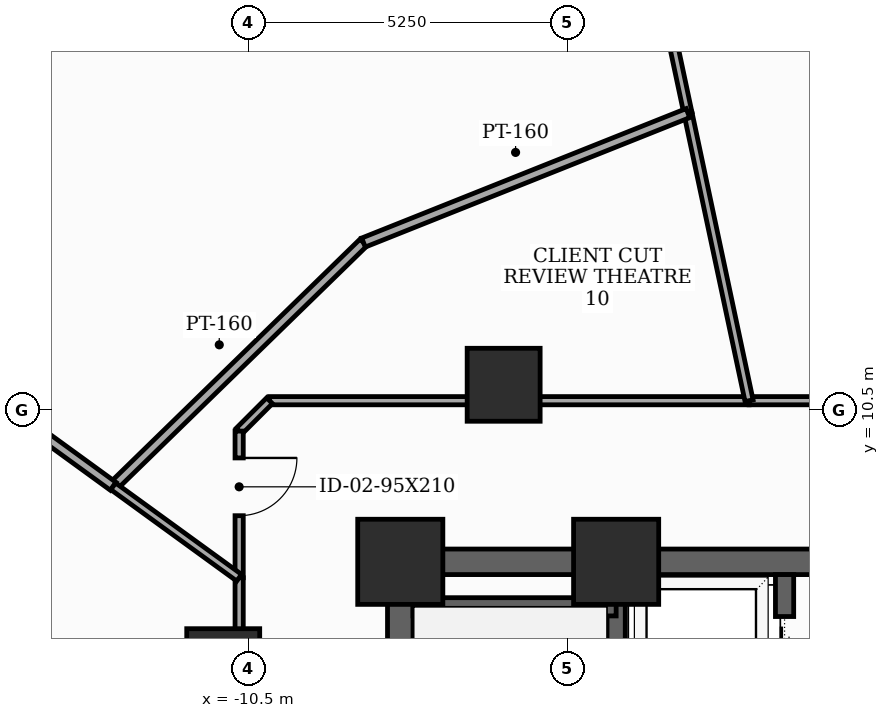
"""IFC4 building model, lengths in metres.
Left out: names, types, materials, properties, quantities, classifications, styles, units other than length and angle.
Written with IfcOpenShell. Run it as: python <this file> out.ifc"""

import sys

from ifc_helpers import new_model, si_unit, direction, frame, frame_2d, origin, origin_2d, place, context, subcontext, project, spatial, rectangle, extrude, element, fill, save


model = new_model("IFC4")
c1 = context("Model", 3, precision=1e-05, world=origin(), true_north=direction((0.0, 1.0)))
c2 = subcontext(c1, "Body", "Model", "MODEL_VIEW")
j1 = project(units=[si_unit("LENGTHUNIT", "METRE"), si_unit("PLANEANGLEUNIT", "RADIAN")], contexts=[c1])
p1 = place(None, origin())
s1 = spatial("IfcSite", under=j1, at=p1, CompositionType="ELEMENT")
p2 = place(p1, origin())
s2 = spatial("IfcBuilding", under=s1, at=p2, CompositionType="ELEMENT")
p3 = place(p2, frame((0.0, 0.0, 94.0)))
s3 = spatial("IfcBuildingStorey", under=s2, at=p3, CompositionType="ELEMENT", Elevation=94.0)
for number, where, z_axis, x_axis in (
    (1, (-4.45, 8.0, 0.0), (0.0, 0.0, 1.0), (1.0, 0.0, 0.0)),
    (2, (-8.0, 8.0, 0.0), (0.0, 0.0, 1.0), (1.0, 0.0, 0.0)),
):
    element("IfcColumn", number, at=place(p3, frame(where, z_axis=z_axis, x_axis=x_axis)), inside=s3, PredefinedType="COLUMN", context=c2, shape_type="SweptSolid", body=[
        extrude(rectangle(XDim=1.4, YDim=1.4, at=origin_2d()), origin(), (0.0, 0.0, 1.0), 3.7),
    ])
for number, where, z_axis, x_axis in (
    (3, (-6.3, 10.912, 0.0), (0.0, 0.0, 1.0), (1.0, 0.0, 0.0)),
    (4, (-10.912, 6.3, 0.0), (0.0, 0.0, 1.0), (1.0, 0.0, 0.0)),
):
    element("IfcColumn", number, at=place(p3, frame(where, z_axis=z_axis, x_axis=x_axis)), inside=s3, PredefinedType="COLUMN", context=c2, shape_type="SweptSolid", body=[
        extrude(rectangle(XDim=1.2, YDim=1.2, at=origin_2d()), origin(), (0.0, 0.0, 1.0), 3.7),
    ])
p4 = place(p3, frame((-8.0, -8.0, 0.0), z_axis=(0.0, 0.0, 1.0), x_axis=(0.0, 1.0, 0.0)))
e5 = element("IfcWall", 5, at=p4, inside=s3, PredefinedType="SHEAR", context=c2, shape_type="SweptSolid", body=[
    extrude(rectangle(XDim=16.0, YDim=0.42, at=frame_2d((8.0, 0.0))), origin(), (0.0, 0.0, 1.0), 3.5),
])
p5 = place(p4, frame((0.922, 0.0, 0.0)))
e6 = element("IfcOpeningElement", 6, at=p5, cuts=e5, PredefinedType="OPENING", context=c2, shape_type="SweptSolid", body=[
    extrude(rectangle(XDim=0.85, YDim=2.02, at=frame_2d((0.425, 1.01))), frame((0.0, 0.22, 0.0), z_axis=(0.0, -1.0, 0.0), x_axis=(1.0, 0.0, 0.0)), (0.0, 0.0, 1.0), 0.44),
])
p6 = place(p4, frame((5.35, 0.0, 0.0)))
e7 = element("IfcOpeningElement", 7, at=p6, cuts=e5, PredefinedType="OPENING", context=c2, shape_type="SweptSolid", body=[
    extrude(rectangle(XDim=1.05, YDim=2.15, at=frame_2d((0.525, 1.075))), frame((0.0, 0.22, 0.0), z_axis=(0.0, -1.0, 0.0), x_axis=(1.0, 0.0, 0.0)), (0.0, 0.0, 1.0), 0.44),
])
p7 = place(p3, frame((-8.0, 8.0, 0.0), z_axis=(0.0, 0.0, 1.0), x_axis=(1.0, 0.0, 0.0)))
e8 = element("IfcWall", 8, at=p7, inside=s3, PredefinedType="SHEAR", context=c2, shape_type="SweptSolid", body=[
    extrude(rectangle(XDim=16.0, YDim=0.42, at=frame_2d((8.0, 0.0))), origin(), (0.0, 0.0, 1.0), 3.5),
])
p8 = place(p7, frame((7.1, 0.0, 0.0)))
e9 = element("IfcOpeningElement", 9, at=p8, cuts=e8, PredefinedType="OPENING", context=c2, shape_type="SweptSolid", body=[
    extrude(rectangle(XDim=1.8, YDim=2.15, at=frame_2d((0.9, 1.075))), frame((0.0, 0.22, 0.0), z_axis=(0.0, -1.0, 0.0), x_axis=(1.0, 0.0, 0.0)), (0.0, 0.0, 1.0), 0.44),
])
p9 = place(p3, frame((-4.45, -7.79, 0.0), z_axis=(0.0, 0.0, 1.0), x_axis=(0.0, 1.0, 0.0)))
e10 = element("IfcWall", 10, at=p9, inside=s3, PredefinedType="SHEAR", context=c2, shape_type="SweptSolid", body=[
    extrude(rectangle(XDim=15.58, YDim=0.3, at=frame_2d((7.79, 0.0))), origin(), (0.0, 0.0, 1.0), 3.5),
])
p10 = place(p3, frame((-7.79, 7.26, 0.0), z_axis=(0.0, 0.0, 1.0), x_axis=(1.0, 0.0, 0.0)))
e11 = element("IfcWall", 11, at=p10, inside=s3, PredefinedType="SHEAR", context=c2, shape_type="SweptSolid", body=[
    extrude(rectangle(XDim=3.34, YDim=0.3, at=frame_2d((1.67, 0.0))), origin(), (0.0, 0.0, 1.0), 3.5),
])
p11 = place(p3, frame((-1.68, -4.85, 0.0), z_axis=(0.0, 0.0, 1.0), x_axis=(0.0, 1.0, 0.0)))
e12 = element("IfcWall", 12, at=p11, inside=s3, PredefinedType="SHEAR", context=c2, shape_type="SweptSolid", body=[
    extrude(rectangle(XDim=12.64, YDim=0.3, at=frame_2d((6.32, 0.0))), origin(), (0.0, 0.0, 1.0), 3.5),
])
p12 = place(p11, frame((3.95, 0.0, 0.0)))
e13 = element("IfcOpeningElement", 13, at=p12, cuts=e12, PredefinedType="OPENING", context=c2, shape_type="SweptSolid", body=[
    extrude(rectangle(XDim=1.1, YDim=2.1, at=frame_2d((0.55, 1.05))), frame((0.0, 0.16, 0.0), z_axis=(0.0, -1.0, 0.0), x_axis=(1.0, 0.0, 0.0)), (0.0, 0.0, 1.0), 0.32),
])
p13 = place(p11, frame((6.25, 0.0, 0.0)))
e14 = element("IfcOpeningElement", 14, at=p13, cuts=e12, PredefinedType="OPENING", context=c2, shape_type="SweptSolid", body=[
    extrude(rectangle(XDim=1.1, YDim=2.1, at=frame_2d((0.55, 1.05))), frame((0.0, 0.16, 0.0), z_axis=(0.0, -1.0, 0.0), x_axis=(1.0, 0.0, 0.0)), (0.0, 0.0, 1.0), 0.32),
])
p14 = place(p11, frame((8.55, 0.0, 0.0)))
e15 = element("IfcOpeningElement", 15, at=p14, cuts=e12, PredefinedType="OPENING", context=c2, shape_type="SweptSolid", body=[
    extrude(rectangle(XDim=1.1, YDim=2.1, at=frame_2d((0.55, 1.05))), frame((0.0, 0.16, 0.0), z_axis=(0.0, -1.0, 0.0), x_axis=(1.0, 0.0, 0.0)), (0.0, 0.0, 1.0), 0.32),
])
p15 = place(p11, frame((10.85, 0.0, 0.0)))
e16 = element("IfcOpeningElement", 16, at=p15, cuts=e12, PredefinedType="OPENING", context=c2, shape_type="SweptSolid", body=[
    extrude(rectangle(XDim=1.1, YDim=2.1, at=frame_2d((0.55, 1.05))), frame((0.0, 0.16, 0.0), z_axis=(0.0, -1.0, 0.0), x_axis=(1.0, 0.0, 0.0)), (0.0, 0.0, 1.0), 0.32),
])
p16 = place(p11, frame((1.15, 0.0, 0.0)))
e17 = element("IfcOpeningElement", 17, at=p16, cuts=e12, PredefinedType="OPENING", context=c2, shape_type="SweptSolid", body=[
    extrude(rectangle(XDim=0.92, YDim=2.1, at=frame_2d((0.46, 1.05))), frame((0.0, 0.16, 0.0), z_axis=(0.0, -1.0, 0.0), x_axis=(1.0, 0.0, 0.0)), (0.0, 0.0, 1.0), 0.32),
])
p17 = place(p3, frame((10.15, 10.65, 0.0), z_axis=(0.0, 0.0, 1.0), x_axis=(-1.0, 0.0, 0.0)))
e18 = element("IfcWall", 18, at=p17, inside=s3, PredefinedType="PARTITIONING", context=c2, shape_type="SweptSolid", body=[
    extrude(rectangle(XDim=12.414, YDim=0.135, at=frame_2d((6.207, 0.0))), origin(), (0.0, 0.0, 1.0), 2.785),
])
p18 = place(p17, frame((7.222, 0.0, 0.0)))
e19 = element("IfcOpeningElement", 19, at=p18, cuts=e18, PredefinedType="OPENING", context=c2, shape_type="SweptSolid", body=[
    extrude(rectangle(XDim=0.95, YDim=2.1, at=frame_2d((0.475, 1.05))), frame((0.0, 0.077, 0.0), z_axis=(0.0, -1.0, 0.0), x_axis=(1.0, 0.0, 0.0)), (0.0, 0.0, 1.0), 0.155),
])
p19 = place(p3, frame((-2.264, 10.65, 0.0), z_axis=(0.0, 0.0, 1.0), x_axis=(-1.0, 0.0, 0.0)))
e20 = element("IfcWall", 20, at=p19, inside=s3, PredefinedType="PARTITIONING", context=c2, shape_type="SweptSolid", body=[
    extrude(rectangle(XDim=7.886, YDim=0.135, at=frame_2d((3.943, 0.0))), origin(), (0.0, 0.0, 1.0), 2.785),
])
p20 = place(p3, frame((-10.15, 10.65, 0.0), z_axis=(0.0, 0.0, 1.0), x_axis=(-0.707106781187, -0.707106781187, 0.0)))
e21 = element("IfcWall", 21, at=p20, inside=s3, PredefinedType="PARTITIONING", context=c2, shape_type="SweptSolid", body=[
    extrude(rectangle(XDim=0.707, YDim=0.135, at=frame_2d((0.354, 0.0))), origin(), (0.0, 0.0, 1.0), 3.5),
])
p21 = place(p3, frame((-10.65, 10.15, 0.0), z_axis=(0.0, 0.0, 1.0), x_axis=(0.0, -1.0, 0.0)))
e22 = element("IfcWall", 22, at=p21, inside=s3, PredefinedType="PARTITIONING", context=c2, shape_type="SweptSolid", body=[
    extrude(rectangle(XDim=2.412, YDim=0.135, at=frame_2d((1.206, 0.0))), origin(), (0.0, 0.0, 1.0), 3.5),
])
p22 = place(p21, frame((0.442, 0.0, 0.0)))
e23 = element("IfcOpeningElement", 23, at=p22, cuts=e22, PredefinedType="OPENING", context=c2, shape_type="SweptSolid", body=[
    extrude(rectangle(XDim=0.95, YDim=2.1, at=frame_2d((0.475, 1.05))), frame((0.0, 0.077, 0.0), z_axis=(0.0, -1.0, 0.0), x_axis=(1.0, 0.0, 0.0)), (0.0, 0.0, 1.0), 0.155),
])
p23 = place(p3, frame((-10.65, 7.738, 0.0), z_axis=(0.0, 0.0, 1.0), x_axis=(0.0, -1.0, 0.0)))
e24 = element("IfcWall", 24, at=p23, inside=s3, PredefinedType="PARTITIONING", context=c2, shape_type="SweptSolid", body=[
    extrude(rectangle(XDim=5.288, YDim=0.135, at=frame_2d((2.644, 0.0))), origin(), (0.0, 0.0, 1.0), 2.785),
])
p24 = place(p23, frame((3.755, 0.0, 0.0)))
e25 = element("IfcOpeningElement", 25, at=p24, cuts=e24, PredefinedType="OPENING", context=c2, shape_type="SweptSolid", body=[
    extrude(rectangle(XDim=0.95, YDim=2.1, at=frame_2d((0.475, 1.05))), frame((0.0, 0.077, 0.0), z_axis=(0.0, -1.0, 0.0), x_axis=(1.0, 0.0, 0.0)), (0.0, 0.0, 1.0), 0.155),
])
p25 = place(p3, frame((-6.381, 30.021, 0.0), z_axis=(0.0, 0.0, 1.0), x_axis=(0.207886847462, -0.978152881022, 0.0)))
e26 = element("IfcWall", 26, at=p25, inside=s3, PredefinedType="PARTITIONING", context=c2, shape_type="SweptSolid", body=[
    extrude(rectangle(XDim=14.968, YDim=0.135, at=frame_2d((7.484, 0.0))), origin(), (0.0, 0.0, 1.0), 2.935),
])
p26 = place(p25, frame((7.024, 0.0, 0.0)))
e27 = element("IfcOpeningElement", 27, at=p26, cuts=e26, PredefinedType="OPENING", context=c2, shape_type="SweptSolid", body=[
    extrude(rectangle(XDim=0.92, YDim=2.1, at=frame_2d((0.46, 1.05))), frame((0.0, 0.077, 0.0), z_axis=(0.0, -1.0, 0.0), x_axis=(1.0, 0.0, 0.0)), (0.0, 0.0, 1.0), 0.155),
])
p27 = place(p3, frame((-3.269, 15.38, 0.0), z_axis=(0.0, 0.0, 1.0), x_axis=(0.207859963491, -0.978158594287, 0.0)))
e28 = element("IfcWall", 28, at=p27, inside=s3, PredefinedType="PARTITIONING", context=c2, shape_type="SweptSolid", body=[
    extrude(rectangle(XDim=4.836, YDim=0.135, at=frame_2d((2.418, 0.0))), origin(), (0.0, 0.0, 1.0), 2.785),
])
p28 = place(p3, frame((-12.721, 9.242, 0.0), z_axis=(0.0, 0.0, 1.0), x_axis=(0.716351016203, 0.697740081682, 0.0)))
e29 = element("IfcWall", 29, at=p28, inside=s3, PredefinedType="PARTITIONING", context=c2, shape_type="SweptSolid", body=[
    extrude(rectangle(XDim=5.746, YDim=0.16, at=frame_2d((2.873, 0.0))), origin(), (0.0, 0.0, 1.0), 2.785),
])
p29 = place(p3, frame((-8.605, 13.251, 0.0), z_axis=(0.0, 0.0, 1.0), x_axis=(0.928804577443, 0.370569908277, 0.0)))
e30 = element("IfcWall", 30, at=p29, inside=s3, PredefinedType="PARTITIONING", context=c2, shape_type="SweptSolid", body=[
    extrude(rectangle(XDim=5.745, YDim=0.16, at=frame_2d((2.873, 0.0))), origin(), (0.0, 0.0, 1.0), 2.785),
])
p30 = place(p3, frame((-16.004, 11.628, 0.0), z_axis=(0.0, 0.0, 1.0), x_axis=(0.80899612579, -0.587813974364, 0.0)))
e31 = element("IfcWall", 31, at=p30, inside=s3, PredefinedType="PARTITIONING", context=c2, shape_type="SweptSolid", body=[
    extrude(rectangle(XDim=4.059, YDim=0.16, at=frame_2d((2.029, 0.0))), origin(), (0.0, 0.0, 1.0), 2.925),
])
p31 = place(p3, frame((-12.721, 9.242, 0.0), z_axis=(0.0, 0.0, 1.0), x_axis=(0.80916485127, -0.58758169089, 0.0)))
e32 = element("IfcWall", 32, at=p31, inside=s3, PredefinedType="PARTITIONING", context=c2, shape_type="SweptSolid", body=[
    extrude(rectangle(XDim=2.56, YDim=0.135, at=frame_2d((1.28, 0.0))), origin(), (0.0, 0.0, 1.0), 3.125),
])
p32 = place(p15, origin())
e33 = element("IfcDoor", 33, at=p32, inside=s3, OperationType="SLIDING_TO_LEFT", PredefinedType="DOOR", context=c2, shape_type="SweptSolid", body=[
    extrude(rectangle(XDim=1.1, YDim=2.1, at=frame_2d((0.55, 1.05))), frame((0.0, 0.025, 0.0), z_axis=(0.0, -1.0, 0.0), x_axis=(1.0, 0.0, 0.0)), (0.0, 0.0, 1.0), 0.05),
])
fill(e16, e33)
p33 = place(p22, origin())
e34 = element("IfcDoor", 34, at=p33, inside=s3, OperationType="SINGLE_SWING_LEFT", PredefinedType="DOOR", context=c2, shape_type="SweptSolid", body=[
    extrude(rectangle(XDim=0.95, YDim=2.1, at=frame_2d((0.475, 1.05))), frame((0.0, 0.025, 0.0), z_axis=(0.0, -1.0, 0.0), x_axis=(1.0, 0.0, 0.0)), (0.0, 0.0, 1.0), 0.05),
])
fill(e23, e34)
save(model, sys.argv[1])
